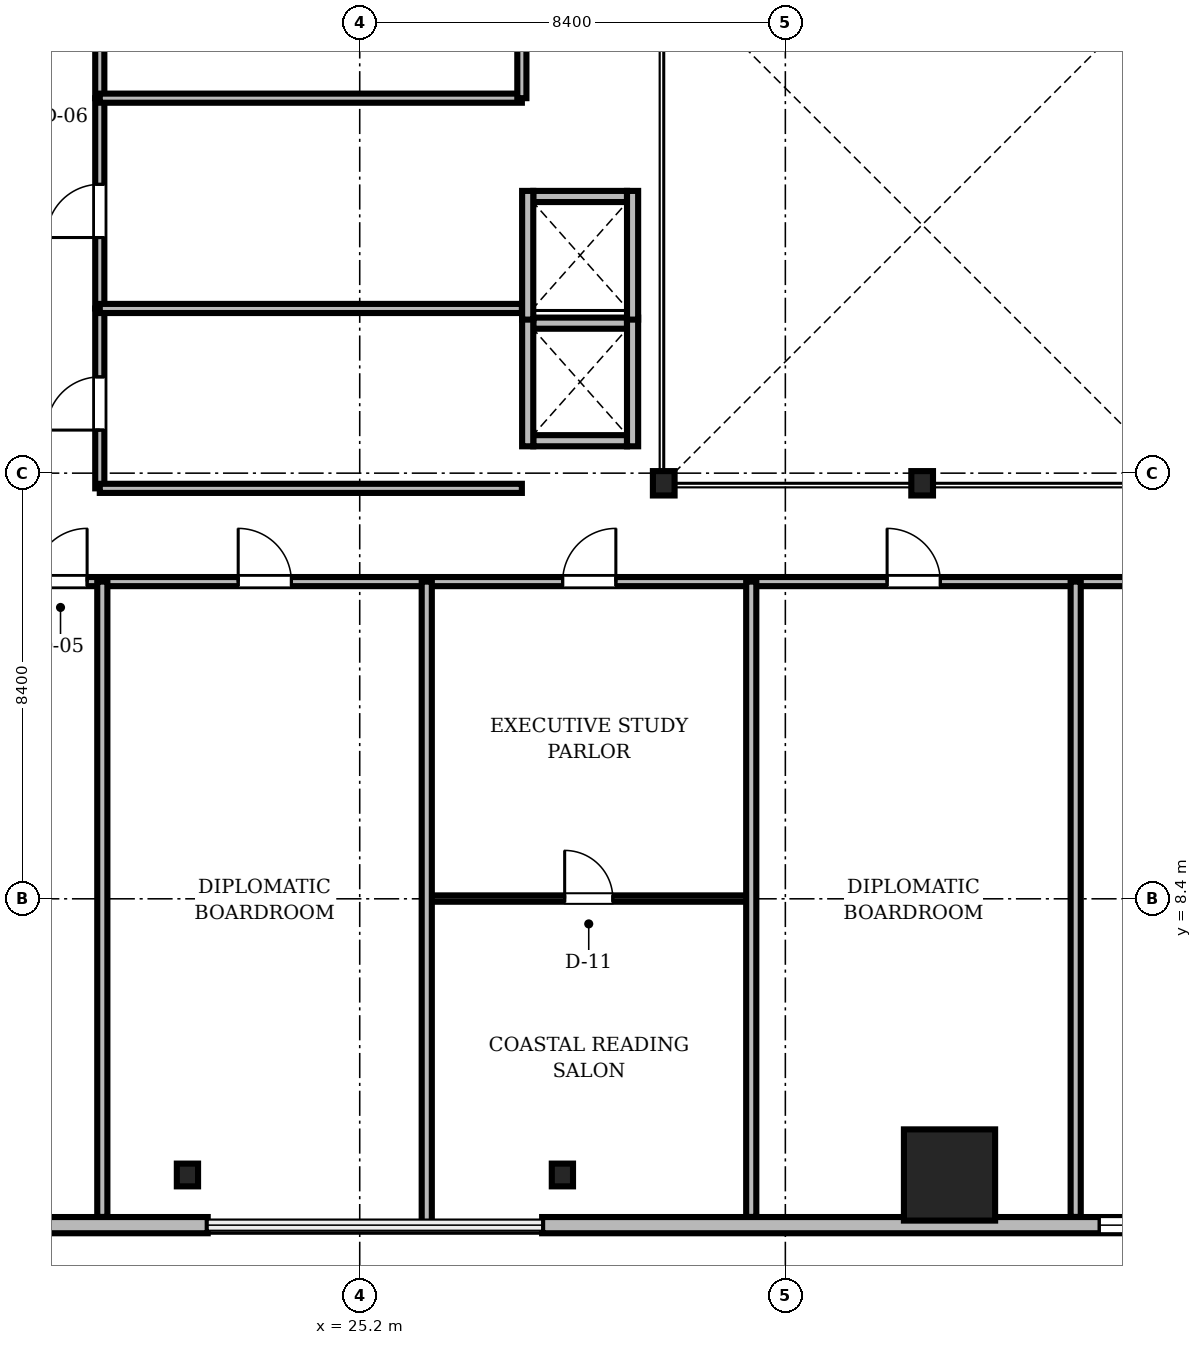
"""IFC4 building model, lengths in metres.
Left out: names, types, materials, properties, quantities, classifications, styles, units other than length and angle.
Written with IfcOpenShell. Run it as: python <this file> out.ifc"""

import sys

from ifc_helpers import new_model, si_unit, direction, frame, frame_2d, origin, origin_2d, place, context, subcontext, project, spatial, rectangle, i_section, extrude, source, transform, mapped, element, fill, save


model = new_model("IFC4")
c1 = context("Model", 3, precision=1e-05, world=origin(), true_north=direction((0.0, 1.0)))
c2 = subcontext(c1, "Body", "Model", "MODEL_VIEW")
j1 = project(units=[si_unit("LENGTHUNIT", "METRE"), si_unit("PLANEANGLEUNIT", "RADIAN")], contexts=[c1])
p1 = place(None, origin())
s1 = spatial("IfcSite", under=j1, at=p1, CompositionType="ELEMENT")
p2 = place(p1, origin())
s2 = spatial("IfcBuilding", under=s1, at=p2, CompositionType="ELEMENT")
p3 = place(p2, frame((0.0, 0.0, 34.9)))
s3 = spatial("IfcBuildingStorey", under=s2, at=p3, CompositionType="ELEMENT", Elevation=34.9)
m1 = source(origin(), c2, "Body", "SweptSolid", [
    extrude(i_section(OverallWidth=0.428, OverallDepth=0.481, WebThickness=0.04, FlangeThickness=0.063, FilletRadius=0.015, at=origin_2d()), origin(), (0.0, 0.0, 1.0), 3.41),
])
for number, where, z_axis, x_axis in (
    (1, (31.2, 16.6, 0.0), (0.0, 0.0, 1.0), (1.0, 0.0, 0.0)),
    (2, (36.3, 16.6, 0.0), (0.0, 0.0, 1.0), (1.0, 0.0, 0.0)),
):
    element("IfcColumn", number, at=place(p3, frame(where, z_axis=z_axis, x_axis=x_axis)), inside=s3, PredefinedType="COLUMN", context=c2, shape_type="MappedRepresentation", body=[
        mapped(m1, transform((0.0, 0.0, 0.0), scale=1.0)),
    ])
m2 = source(origin(), c2, "Body", "SweptSolid", [
    extrude(rectangle(XDim=1.8, YDim=1.8, at=origin_2d()), origin(), (0.0, 0.0, 1.0), 3.41),
])
p4 = place(p3, frame((36.84, 2.95, 0.0), z_axis=(0.0, 0.0, 1.0), x_axis=(1.0, 0.0, 0.0)))
e3 = element("IfcColumn", 3, at=p4, inside=s3, PredefinedType="COLUMN", context=c2, shape_type="MappedRepresentation", body=[
    mapped(m2, transform((0.0, 0.0, 0.0), scale=1.0)),
])
m3 = source(origin(), c2, "Body", "SweptSolid", [
    extrude(i_section(OverallWidth=0.419, OverallDepth=0.449, WebThickness=0.031, FlangeThickness=0.048, FilletRadius=0.015, at=origin_2d()), origin(), (0.0, 0.0, 1.0), 3.41),
])
for number, where, z_axis, x_axis in (
    (4, (21.8, 2.95, 0.0), (0.0, 0.0, 1.0), (1.0, 0.0, 0.0)),
    (5, (29.2, 2.95, 0.0), (0.0, 0.0, 1.0), (1.0, 0.0, 0.0)),
):
    element("IfcColumn", number, at=place(p3, frame(where, z_axis=z_axis, x_axis=x_axis)), inside=s3, PredefinedType="COLUMN", context=c2, shape_type="MappedRepresentation", body=[
        mapped(m3, transform((0.0, 0.0, 0.0), scale=1.0)),
    ])
m4 = source(origin(), c2, "Body", "SweptSolid", [
    extrude(rectangle(XDim=15.6, YDim=0.32, at=frame_2d((7.8, 0.0))), origin(), (0.0, 0.0, 1.0), 3.41),
])
p5 = place(p3, frame((6.6, 1.96, 0.0), z_axis=(0.0, 0.0, 1.0), x_axis=(1.0, 0.0, 0.0)))
e6 = element("IfcWall", 6, at=p5, inside=s3, PredefinedType="SOLIDWALL", context=c2, shape_type="MappedRepresentation", body=[
    mapped(m4, transform((0.0, 0.0, 0.0), scale=1.0)),
])
m5 = source(origin(), c2, "Body", "SweptSolid", [
    extrude(rectangle(XDim=1.4, YDim=2.3, at=frame_2d((0.7, 1.15))), frame((0.0, 0.17, 0.0), z_axis=(0.0, -1.0, 0.0), x_axis=(1.0, 0.0, 0.0)), (0.0, 0.0, 1.0), 0.34),
])
p6 = place(p5, frame((9.61, 0.0, 0.0)))
e7 = element("IfcOpeningElement", 7, at=p6, cuts=e6, PredefinedType="OPENING", context=c2, shape_type="MappedRepresentation", body=[
    mapped(m5, transform((0.0, 0.0, 0.0), scale=1.0)),
])
m6 = source(origin(), c2, "Body", "SweptSolid", [
    extrude(rectangle(XDim=2.8, YDim=2.4, at=frame_2d((1.4, 1.2))), frame((0.0, 0.17, 0.0), z_axis=(0.0, -1.0, 0.0), x_axis=(1.0, 0.0, 0.0)), (0.0, 0.0, 1.0), 0.34),
])
p7 = place(p5, frame((2.705, 0.0, 0.72)))
e8 = element("IfcOpeningElement", 8, at=p7, cuts=e6, PredefinedType="OPENING", context=c2, shape_type="MappedRepresentation", body=[
    mapped(m6, transform((0.0, 0.0, 0.0), scale=1.0)),
])
p8 = place(p3, frame((28.8, 1.96, 0.0), z_axis=(0.0, 0.0, 1.0), x_axis=(1.0, 0.0, 0.0)))
e9 = element("IfcWall", 9, at=p8, inside=s3, PredefinedType="SOLIDWALL", context=c2, shape_type="MappedRepresentation", body=[
    mapped(m4, transform((0.0, 0.0, 0.0), scale=1.0)),
])
p9 = place(p8, frame((10.995, 0.0, 0.72)))
e10 = element("IfcOpeningElement", 10, at=p9, cuts=e9, PredefinedType="OPENING", context=c2, shape_type="MappedRepresentation", body=[
    mapped(m6, transform((0.0, 0.0, 0.0), scale=1.0)),
])
m7 = source(origin(), c2, "Body", "SweptSolid", [
    extrude(rectangle(XDim=1.85, YDim=0.22, at=frame_2d((0.925, 0.0))), origin(), (0.0, 0.0, 1.0), 3.41),
])
for number, where, z_axis, x_axis in (
    (11, (28.625, 17.44, 0.0), (0.0, 0.0, 1.0), (1.0, 0.0, 0.0)),
    (12, (28.625, 19.76, 0.0), (0.0, 0.0, 1.0), (1.0, 0.0, 0.0)),
):
    element("IfcWall", number, at=place(p3, frame(where, z_axis=z_axis, x_axis=x_axis)), inside=s3, PredefinedType="SOLIDWALL", context=c2, shape_type="MappedRepresentation", body=[
        mapped(m7, transform((0.0, 0.0, 0.0), scale=1.0)),
    ])
m8 = source(origin(), c2, "Body", "SweptSolid", [
    extrude(rectangle(XDim=2.54, YDim=0.22, at=frame_2d((1.27, 0.0))), origin(), (0.0, 0.0, 1.0), 3.41),
])
for number, where, z_axis, x_axis in (
    (13, (28.515, 17.33, 0.0), (0.0, 0.0, 1.0), (0.0, 1.0, 0.0)),
    (14, (30.585, 17.33, 0.0), (0.0, 0.0, 1.0), (0.0, 1.0, 0.0)),
):
    element("IfcWall", number, at=place(p3, frame(where, z_axis=z_axis, x_axis=x_axis)), inside=s3, PredefinedType="SOLIDWALL", context=c2, shape_type="MappedRepresentation", body=[
        mapped(m8, transform((0.0, 0.0, 0.0), scale=1.0)),
    ])
p10 = place(p3, frame((28.625, 22.26, 0.0), z_axis=(0.0, 0.0, 1.0), x_axis=(1.0, 0.0, 0.0)))
e15 = element("IfcWall", 15, at=p10, inside=s3, PredefinedType="SOLIDWALL", context=c2, shape_type="MappedRepresentation", body=[
    mapped(m7, transform((0.0, 0.0, 0.0), scale=1.0)),
])
for number, where, z_axis, x_axis in (
    (16, (28.515, 19.83, 0.0), (0.0, 0.0, 1.0), (0.0, 1.0, 0.0)),
    (17, (30.585, 19.83, 0.0), (0.0, 0.0, 1.0), (0.0, 1.0, 0.0)),
):
    element("IfcWall", number, at=place(p3, frame(where, z_axis=z_axis, x_axis=x_axis)), inside=s3, PredefinedType="SOLIDWALL", context=c2, shape_type="MappedRepresentation", body=[
        mapped(m8, transform((0.0, 0.0, 0.0), scale=1.0)),
    ])
m9 = source(origin(), c2, "Body", "SweptSolid", [
    extrude(rectangle(XDim=46.156, YDim=0.18, at=frame_2d((23.078, 0.0))), origin(), (0.0, 0.0, 1.0), 2.652),
])
p11 = place(p3, frame((2.422, 14.66, 0.0), z_axis=(0.0, 0.0, 1.0), x_axis=(1.0, 0.0, 0.0)))
e18 = element("IfcWall", 18, at=p11, inside=s3, PredefinedType="PARTITIONING", context=c2, shape_type="MappedRepresentation", body=[
    mapped(m9, transform((0.0, 0.0, 0.0), scale=1.0)),
])
m10 = source(origin(), c2, "Body", "SweptSolid", [
    extrude(rectangle(XDim=1.05, YDim=2.2, at=frame_2d((0.525, 1.1))), frame((0.0, 0.1, 0.0), z_axis=(0.0, -1.0, 0.0), x_axis=(1.0, 0.0, 0.0)), (0.0, 0.0, 1.0), 0.2),
])
p12 = place(p11, frame((16.348, 0.0, 0.0)))
e19 = element("IfcOpeningElement", 19, at=p12, cuts=e18, PredefinedType="OPENING", context=c2, shape_type="MappedRepresentation", body=[
    mapped(m10, transform((0.0, 0.0, 0.0), scale=1.0)),
])
p13 = place(p11, frame((20.38, 0.0, 0.0)))
e20 = element("IfcOpeningElement", 20, at=p13, cuts=e18, PredefinedType="OPENING", context=c2, shape_type="MappedRepresentation", body=[
    mapped(m10, transform((0.0, 0.0, 0.0), scale=1.0)),
])
p14 = place(p11, frame((26.783, 0.0, 0.0)))
e21 = element("IfcOpeningElement", 21, at=p14, cuts=e18, PredefinedType="OPENING", context=c2, shape_type="MappedRepresentation", body=[
    mapped(m10, transform((0.0, 0.0, 0.0), scale=1.0)),
])
p15 = place(p11, frame((33.186, 0.0, 0.0)))
e22 = element("IfcOpeningElement", 22, at=p15, cuts=e18, PredefinedType="OPENING", context=c2, shape_type="MappedRepresentation", body=[
    mapped(m10, transform((0.0, 0.0, 0.0), scale=1.0)),
])
p16 = place(p11, frame((40.998, 0.0, 0.0)))
e23 = element("IfcOpeningElement", 23, at=p16, cuts=e18, PredefinedType="OPENING", context=c2, shape_type="MappedRepresentation", body=[
    mapped(m10, transform((0.0, 0.0, 0.0), scale=1.0)),
])
m11 = source(origin(), c2, "Body", "SweptSolid", [
    extrude(rectangle(XDim=6.404, YDim=0.125, at=frame_2d((3.202, 0.0))), origin(), (0.0, 0.0, 1.0), 2.802),
])
p17 = place(p3, frame((26.523, 8.405, 0.0), z_axis=(0.0, 0.0, 1.0), x_axis=(1.0, 0.0, 0.0)))
e24 = element("IfcWall", 24, at=p17, inside=s3, PredefinedType="PARTITIONING", context=c2, shape_type="MappedRepresentation", body=[
    mapped(m11, transform((0.0, 0.0, 0.0), scale=1.0)),
])
m12 = source(origin(), c2, "Body", "SweptSolid", [
    extrude(rectangle(XDim=0.95, YDim=2.15, at=frame_2d((0.475, 1.075))), frame((0.0, 0.073, 0.0), z_axis=(0.0, -1.0, 0.0), x_axis=(1.0, 0.0, 0.0)), (0.0, 0.0, 1.0), 0.145),
])
p18 = place(p17, frame((2.722, 0.0, 0.0)))
e25 = element("IfcOpeningElement", 25, at=p18, cuts=e24, PredefinedType="OPENING", context=c2, shape_type="MappedRepresentation", body=[
    mapped(m12, transform((0.0, 0.0, 0.0), scale=1.0)),
])
m13 = source(origin(), c2, "Body", "SweptSolid", [
    extrude(rectangle(XDim=4.24, YDim=0.18, at=frame_2d((2.12, 0.0))), origin(), (0.0, 0.0, 1.0), 2.802),
])
p19 = place(p3, frame((20.07, 24.2, 0.0), z_axis=(0.0, 0.0, 1.0), x_axis=(0.0, 1.0, 0.0)))
e26 = element("IfcWall", 26, at=p19, inside=s3, PredefinedType="PARTITIONING", context=c2, shape_type="MappedRepresentation", body=[
    mapped(m13, transform((0.0, 0.0, 0.0), scale=1.0)),
])
p20 = place(p19, frame((1.4, 0.0, 0.0)))
e27 = element("IfcOpeningElement", 27, at=p20, cuts=e26, PredefinedType="OPENING", context=c2, shape_type="MappedRepresentation", body=[
    mapped(m10, transform((0.0, 0.0, 0.0), scale=1.0)),
])
m14 = source(origin(), c2, "Body", "SweptSolid", [
    extrude(rectangle(XDim=4.15, YDim=0.18, at=frame_2d((2.075, 0.0))), origin(), (0.0, 0.0, 1.0), 3.042),
])
p21 = place(p3, frame((20.07, 20.05, 0.0), z_axis=(0.0, 0.0, 1.0), x_axis=(0.0, 1.0, 0.0)))
e28 = element("IfcWall", 28, at=p21, inside=s3, PredefinedType="PARTITIONING", context=c2, shape_type="MappedRepresentation", body=[
    mapped(m14, transform((0.0, 0.0, 0.0), scale=1.0)),
])
p22 = place(p21, frame((1.4, 0.0, 0.0)))
e29 = element("IfcOpeningElement", 29, at=p22, cuts=e28, PredefinedType="OPENING", context=c2, shape_type="MappedRepresentation", body=[
    mapped(m10, transform((0.0, 0.0, 0.0), scale=1.0)),
])
m15 = source(origin(), c2, "Body", "SweptSolid", [
    extrude(rectangle(XDim=3.55, YDim=0.18, at=frame_2d((1.775, 0.0))), origin(), (0.0, 0.0, 1.0), 2.802),
])
p23 = place(p3, frame((20.07, 16.5, 0.0), z_axis=(0.0, 0.0, 1.0), x_axis=(0.0, 1.0, 0.0)))
e30 = element("IfcWall", 30, at=p23, inside=s3, PredefinedType="PARTITIONING", context=c2, shape_type="MappedRepresentation", body=[
    mapped(m15, transform((0.0, 0.0, 0.0), scale=1.0)),
])
p24 = place(p23, frame((1.15, 0.0, 0.0)))
e31 = element("IfcOpeningElement", 31, at=p24, cuts=e30, PredefinedType="OPENING", context=c2, shape_type="MappedRepresentation", body=[
    mapped(m10, transform((0.0, 0.0, 0.0), scale=1.0)),
])
m16 = source(origin(), c2, "Body", "SweptSolid", [
    extrude(rectangle(XDim=12.538, YDim=0.2, at=frame_2d((6.269, 0.0))), origin(), (0.0, 0.0, 1.0), 2.652),
])
p25 = place(p3, frame((20.12, 2.122, 0.0), z_axis=(0.0, 0.0, 1.0), x_axis=(0.0, 1.0, 0.0)))
e32 = element("IfcWall", 32, at=p25, inside=s3, PredefinedType="PARTITIONING", context=c2, shape_type="MappedRepresentation", body=[
    mapped(m16, transform((0.0, 0.0, 0.0), scale=1.0)),
])
m17 = source(origin(), c2, "Body", "SweptSolid", [
    extrude(rectangle(XDim=12.73, YDim=0.2, at=frame_2d((6.365, 0.0))), origin(), (0.0, 0.0, 1.0), 2.652),
])
p26 = place(p3, frame((26.523, 1.93, 0.0), z_axis=(0.0, 0.0, 1.0), x_axis=(0.0, 1.0, 0.0)))
e33 = element("IfcWall", 33, at=p26, inside=s3, PredefinedType="PARTITIONING", context=c2, shape_type="MappedRepresentation", body=[
    mapped(m17, transform((0.0, 0.0, 0.0), scale=1.0)),
])
for number, where, z_axis, x_axis in (
    (34, (32.927, 2.122, 0.0), (0.0, 0.0, 1.0), (0.0, 1.0, 0.0)),
    (35, (39.33, 2.122, 0.0), (0.0, 0.0, 1.0), (0.0, 1.0, 0.0)),
):
    element("IfcWall", number, at=place(p3, frame(where, z_axis=z_axis, x_axis=x_axis)), inside=s3, PredefinedType="PARTITIONING", context=c2, shape_type="MappedRepresentation", body=[
        mapped(m16, transform((0.0, 0.0, 0.0), scale=1.0)),
    ])
m18 = source(origin(), c2, "Body", "SweptSolid", [
    extrude(rectangle(XDim=8.33, YDim=0.18, at=frame_2d((4.165, 0.0))), origin(), (0.0, 0.0, 1.0), 2.802),
])
p27 = place(p3, frame((20.07, 16.5, 0.0), z_axis=(0.0, 0.0, 1.0), x_axis=(1.0, 0.0, 0.0)))
e36 = element("IfcWall", 36, at=p27, inside=s3, PredefinedType="PARTITIONING", context=c2, shape_type="MappedRepresentation", body=[
    mapped(m18, transform((0.0, 0.0, 0.0), scale=1.0)),
])
m19 = source(origin(), c2, "Body", "SweptSolid", [
    extrude(rectangle(XDim=8.33, YDim=0.18, at=frame_2d((4.165, 0.0))), origin(), (0.0, 0.0, 1.0), 3.41),
])
for number, where, z_axis, x_axis in (
    (37, (20.07, 20.05, 0.0), (0.0, 0.0, 1.0), (1.0, 0.0, 0.0)),
    (38, (20.07, 24.2, 0.0), (0.0, 0.0, 1.0), (1.0, 0.0, 0.0)),
):
    element("IfcWall", number, at=place(p3, frame(where, z_axis=z_axis, x_axis=x_axis)), inside=s3, PredefinedType="PARTITIONING", context=c2, shape_type="MappedRepresentation", body=[
        mapped(m19, transform((0.0, 0.0, 0.0), scale=1.0)),
    ])
p28 = place(p3, frame((28.4, 24.2, 0.0), z_axis=(0.0, 0.0, 1.0), x_axis=(0.0, 1.0, 0.0)))
e39 = element("IfcWall", 39, at=p28, inside=s3, PredefinedType="PARTITIONING", context=c2, shape_type="MappedRepresentation", body=[
    mapped(m13, transform((0.0, 0.0, 0.0), scale=1.0)),
])
m20 = source(origin(), c2, "Body", "SweptSolid", [
    extrude(rectangle(XDim=2.8, YDim=2.4, at=frame_2d((1.4, 1.2))), frame((0.0, 0.03, 0.0), z_axis=(0.0, -1.0, 0.0), x_axis=(1.0, 0.0, 0.0)), (0.0, 0.0, 1.0), 0.06),
])
p29 = place(p9, origin())
e40 = element("IfcWindow", 40, at=p29, inside=s3, PartitioningType="SINGLE_PANEL", PredefinedType="WINDOW", context=c2, shape_type="MappedRepresentation", body=[
    mapped(m20, transform((0.0, 0.0, 0.0), scale=1.0)),
])
fill(e10, e40)
m21 = source(origin(), c2, "Body", "SweptSolid", [
    extrude(rectangle(XDim=1.05, YDim=2.2, at=frame_2d((0.525, 1.1))), frame((0.0, 0.025, 0.0), z_axis=(0.0, -1.0, 0.0), x_axis=(1.0, 0.0, 0.0)), (0.0, 0.0, 1.0), 0.05),
])
p30 = place(p12, origin())
e41 = element("IfcDoor", 41, at=p30, inside=s3, OperationType="SINGLE_SWING_RIGHT", PredefinedType="DOOR", context=c2, shape_type="MappedRepresentation", body=[
    mapped(m21, transform((0.0, 0.0, 0.0), scale=1.0)),
])
fill(e19, e41)
p31 = place(p13, origin())
e42 = element("IfcDoor", 42, at=p31, inside=s3, OperationType="SINGLE_SWING_LEFT", PredefinedType="DOOR", context=c2, shape_type="MappedRepresentation", body=[
    mapped(m21, transform((0.0, 0.0, 0.0), scale=1.0)),
])
fill(e20, e42)
p32 = place(p14, origin())
e43 = element("IfcDoor", 43, at=p32, inside=s3, OperationType="SINGLE_SWING_RIGHT", PredefinedType="DOOR", context=c2, shape_type="MappedRepresentation", body=[
    mapped(m21, transform((0.0, 0.0, 0.0), scale=1.0)),
])
fill(e21, e43)
p33 = place(p15, origin())
e44 = element("IfcDoor", 44, at=p33, inside=s3, OperationType="SINGLE_SWING_LEFT", PredefinedType="DOOR", context=c2, shape_type="MappedRepresentation", body=[
    mapped(m21, transform((0.0, 0.0, 0.0), scale=1.0)),
])
fill(e22, e44)
m22 = source(origin(), c2, "Body", "SweptSolid", [
    extrude(rectangle(XDim=0.95, YDim=2.15, at=frame_2d((0.475, 1.075))), frame((0.0, 0.025, 0.0), z_axis=(0.0, -1.0, 0.0), x_axis=(1.0, 0.0, 0.0)), (0.0, 0.0, 1.0), 0.05),
])
p34 = place(p18, origin())
e45 = element("IfcDoor", 45, at=p34, inside=s3, OperationType="SINGLE_SWING_LEFT", PredefinedType="DOOR", context=c2, shape_type="MappedRepresentation", body=[
    mapped(m22, transform((0.0, 0.0, 0.0), scale=1.0)),
])
fill(e25, e45)
p35 = place(p22, origin())
e46 = element("IfcDoor", 46, at=p35, inside=s3, OperationType="SINGLE_SWING_LEFT", PredefinedType="DOOR", context=c2, shape_type="MappedRepresentation", body=[
    mapped(m21, transform((0.0, 0.0, 0.0), scale=1.0)),
])
fill(e29, e46)
p36 = place(p24, origin())
e47 = element("IfcDoor", 47, at=p36, inside=s3, OperationType="SINGLE_SWING_LEFT", PredefinedType="DOOR", context=c2, shape_type="MappedRepresentation", body=[
    mapped(m21, transform((0.0, 0.0, 0.0), scale=1.0)),
])
fill(e31, e47)
save(model, sys.argv[1])
